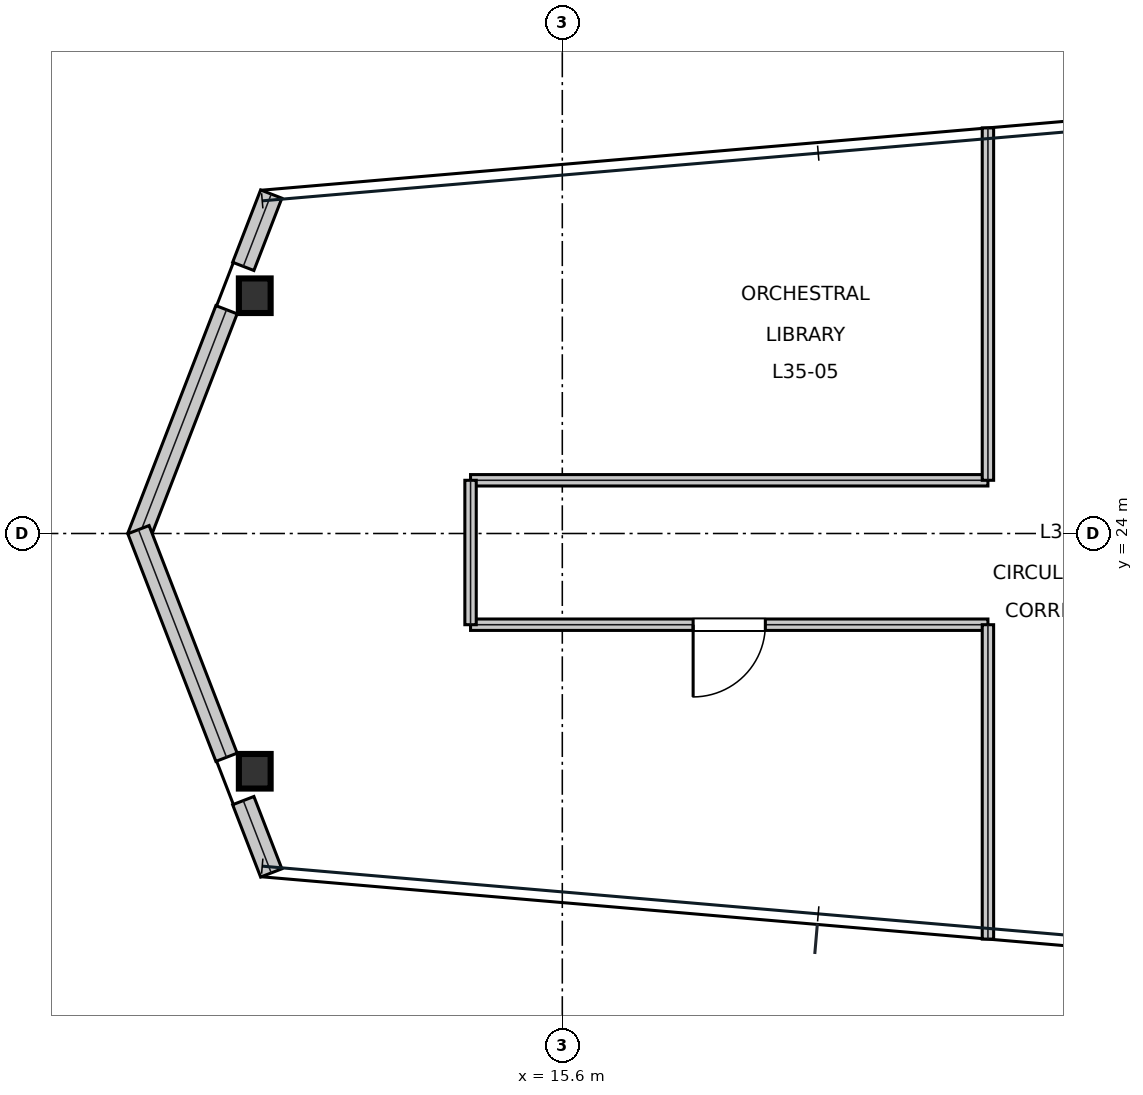
"""IFC4 building model, lengths in metres.
Left out: names, types, materials, properties, quantities, classifications, styles, units other than length and angle.
Written with IfcOpenShell. Run it as: python <this file> out.ifc"""

import sys

from ifc_helpers import new_model, si_unit, direction, frame, frame_2d, origin, origin_2d, place, context, subcontext, project, spatial, rectangle, i_section, extrude, element, fill, save


model = new_model("IFC4")
c1 = context("Model", 3, precision=1e-05, world=origin(), true_north=direction((0.0, 1.0)))
c2 = subcontext(c1, "Body", "Model", "MODEL_VIEW")
j1 = project(units=[si_unit("LENGTHUNIT", "METRE"), si_unit("PLANEANGLEUNIT", "RADIAN")], contexts=[c1])
p1 = place(None, origin())
s1 = spatial("IfcSite", under=j1, at=p1, CompositionType="ELEMENT")
p2 = place(p1, origin())
s2 = spatial("IfcBuilding", under=s1, at=p2, CompositionType="ELEMENT")
p3 = place(p2, frame((0.0, 0.0, 153.3)))
s3 = spatial("IfcBuildingStorey", under=s2, at=p3, CompositionType="ELEMENT", Elevation=153.3)
for number, where, z_axis, x_axis in (
    (1, (11.554, 20.872, 0.016), (0.0, 0.0, 1.0), (1.0, 0.0, 0.0)),
    (2, (11.554, 27.128, 0.016), (0.0, 0.0, 1.0), (1.0, 0.0, 0.0)),
):
    element("IfcColumn", number, at=place(p3, frame(where, z_axis=z_axis, x_axis=x_axis)), inside=s3, PredefinedType="COLUMN", context=c2, shape_type="SweptSolid", body=[
        extrude(i_section(OverallWidth=0.418, OverallDepth=0.455, WebThickness=0.042, FlangeThickness=0.068, at=origin_2d()), origin(), (0.0, 0.0, 1.0), 4.018),
    ])
p4 = place(p3, frame((11.771, 28.466, 0.0), z_axis=(0.0, 0.0, 1.0), x_axis=(-0.360678505659, -0.93269020342, 0.0)))
e3 = element("IfcWall", 3, at=p4, inside=s3, PredefinedType="STANDARD", context=c2, shape_type="SweptSolid", body=[
    extrude(rectangle(XDim=1.02, YDim=0.3, at=frame_2d((0.51, 0.0))), origin(), (0.0, 0.0, 1.0), 3.81),
])
for number, where, z_axis, x_axis in (
    (4, (11.182, 26.944, 0.0), (0.0, 0.0, 1.0), (-0.361, -0.933, 0.0)),
    (5, (10.023, 24.051, 0.0), (0.0, 0.0, 1.0), (0.361, -0.933, 0.0)),
):
    element("IfcWall", number, at=place(p3, frame(where, z_axis=z_axis, x_axis=x_axis)), inside=s3, PredefinedType="STANDARD", context=c2, shape_type="SweptSolid", body=[
        extrude(rectangle(XDim=3.211, YDim=0.3, at=frame_2d((1.605, 0.0))), origin(), (0.0, 0.0, 1.0), 3.81),
    ])
p5 = place(p3, frame((11.403, 20.486, 0.0), z_axis=(0.0, 0.0, 1.0), x_axis=(0.360678505659, -0.93269020342, 0.0)))
e6 = element("IfcWall", 6, at=p5, inside=s3, PredefinedType="STANDARD", context=c2, shape_type="SweptSolid", body=[
    extrude(rectangle(XDim=1.02, YDim=0.3, at=frame_2d((0.51, 0.0))), origin(), (0.0, 0.0, 1.0), 3.81),
])
p6 = place(p3, frame((14.393, 22.8, 0.0), z_axis=(0.0, 0.0, 1.0), x_axis=(1.0, 0.0, 0.0)))
e7 = element("IfcWall", 7, at=p6, inside=s3, PredefinedType="PARTITIONING", context=c2, shape_type="SweptSolid", body=[
    extrude(rectangle(XDim=6.807, YDim=0.15, at=frame_2d((3.404, 0.0))), origin(), (0.0, 0.0, 1.0), 3.443),
])
p7 = place(p6, frame((2.929, 0.0, 0.0)))
e8 = element("IfcOpeningElement", 8, at=p7, cuts=e7, PredefinedType="OPENING", context=c2, shape_type="SweptSolid", body=[
    extrude(rectangle(XDim=0.95, YDim=2.15, at=frame_2d((0.475, 1.075))), frame((0.0, 0.085, 0.0), z_axis=(0.0, -1.0, 0.0), x_axis=(1.0, 0.0, 0.0)), (0.0, 0.0, 1.0), 0.17),
])
p8 = place(p3, frame((14.393, 24.7, 0.0), z_axis=(0.0, 0.0, 1.0), x_axis=(1.0, 0.0, 0.0)))
e9 = element("IfcWall", 9, at=p8, inside=s3, PredefinedType="PARTITIONING", context=c2, shape_type="SweptSolid", body=[
    extrude(rectangle(XDim=6.807, YDim=0.15, at=frame_2d((3.404, 0.0))), origin(), (0.0, 0.0, 1.0), 3.443),
])
p9 = place(p3, frame((21.2, 24.7, 0.0), z_axis=(0.0, 0.0, 1.0), x_axis=(0.0, 1.0, 0.0)))
e10 = element("IfcWall", 10, at=p9, inside=s3, PredefinedType="PARTITIONING", context=c2, shape_type="SweptSolid", body=[
    extrude(rectangle(XDim=4.636, YDim=0.15, at=frame_2d((2.318, 0.0))), origin(), (0.0, 0.0, 1.0), 3.19),
])
p10 = place(p3, frame((21.2, 18.664, 0.0), z_axis=(0.0, 0.0, 1.0), x_axis=(0.0, 1.0, 0.0)))
e11 = element("IfcWall", 11, at=p10, inside=s3, PredefinedType="PARTITIONING", context=c2, shape_type="SweptSolid", body=[
    extrude(rectangle(XDim=4.136, YDim=0.15, at=frame_2d((2.068, 0.0))), origin(), (0.0, 0.0, 1.0), 3.19),
])
p11 = place(p3, frame((14.393, 22.8, 0.0), z_axis=(0.0, 0.0, 1.0), x_axis=(0.0, 1.0, 0.0)))
e12 = element("IfcWall", 12, at=p11, inside=s3, PredefinedType="PARTITIONING", context=c2, shape_type="SweptSolid", body=[
    extrude(rectangle(XDim=1.9, YDim=0.15, at=frame_2d((0.95, 0.0))), origin(), (0.0, 0.0, 1.0), 3.81),
])
p12 = place(p7, frame((0.95, 0.0, 0.0), z_axis=(0.0, 0.0, 1.0), x_axis=(-1.0, 0.0, 0.0)))
e13 = element("IfcDoor", 13, at=p12, inside=s3, OperationType="SINGLE_SWING_RIGHT", PredefinedType="DOOR", context=c2, shape_type="SweptSolid", body=[
    extrude(rectangle(XDim=0.95, YDim=2.15, at=frame_2d((0.475, 1.075))), frame((0.0, 0.025, 0.0), z_axis=(0.0, -1.0, 0.0), x_axis=(1.0, 0.0, 0.0)), (0.0, 0.0, 1.0), 0.05),
])
fill(e8, e13)
save(model, sys.argv[1])
